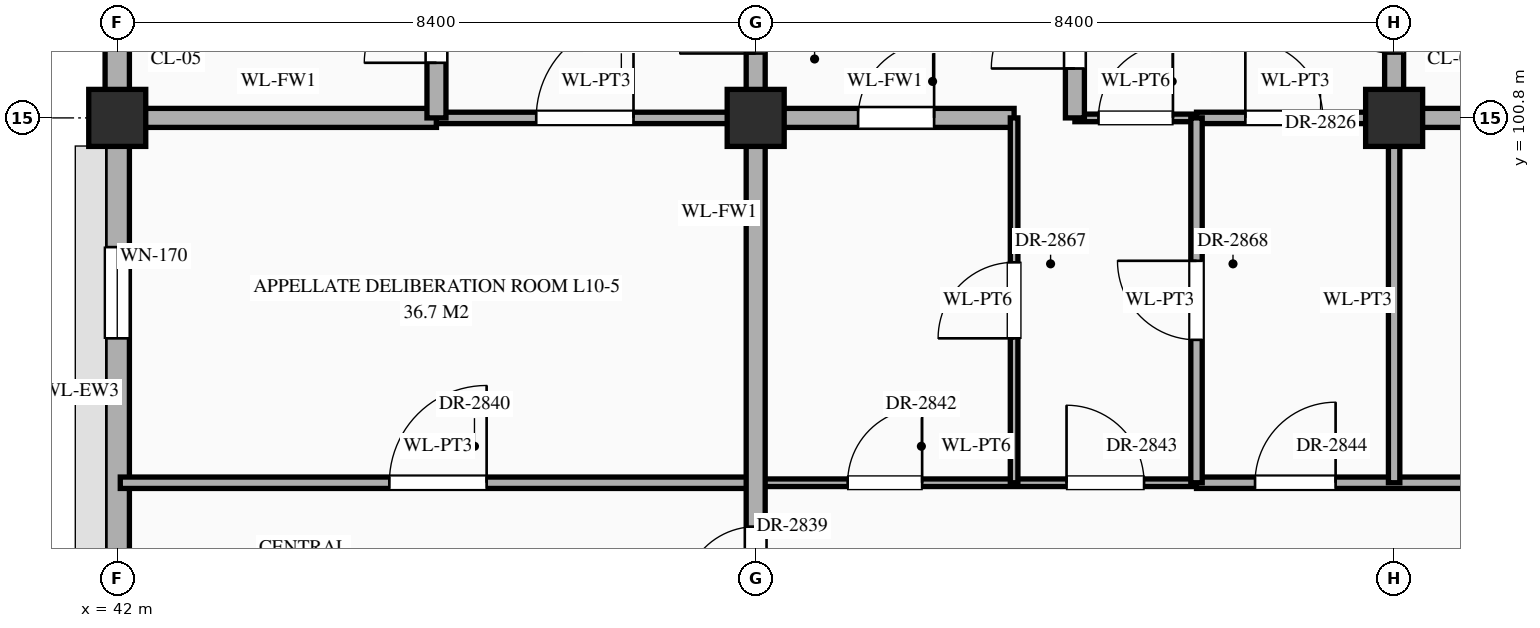
"""IFC4 building model, lengths in metres.
Left out: names, types, materials, properties, quantities, classifications, styles, units other than length and angle.
Written with IfcOpenShell. Run it as: python <this file> out.ifc"""

import sys

from ifc_helpers import new_model, si_unit, direction, frame, frame_2d, origin, origin_2d, place, context, subcontext, project, spatial, rectangle, extrude, element, fill, save


model = new_model("IFC4")
c1 = context("Model", 3, precision=1e-05, world=origin(), true_north=direction((0.0, 1.0)))
c2 = subcontext(c1, "Body", "Model", "MODEL_VIEW")
j1 = project(units=[si_unit("LENGTHUNIT", "METRE"), si_unit("PLANEANGLEUNIT", "RADIAN")], contexts=[c1])
p1 = place(None, origin())
s1 = spatial("IfcSite", under=j1, at=p1, CompositionType="ELEMENT")
p2 = place(p1, origin())
s2 = spatial("IfcBuilding", under=s1, at=p2, CompositionType="ELEMENT")
p3 = place(p2, frame((0.0, 0.0, 43.5)))
s3 = spatial("IfcBuildingStorey", under=s2, at=p3, CompositionType="ELEMENT", Elevation=43.5)
for number, where, z_axis, x_axis in (
    (1, (42.0, 100.8, 0.0), (0.0, 0.0, 1.0), (1.0, 0.0, 0.0)),
    (2, (50.4, 100.8, 0.0), (0.0, 0.0, 1.0), (1.0, 0.0, 0.0)),
    (3, (58.8, 100.8, 0.0), (0.0, 0.0, 1.0), (1.0, 0.0, 0.0)),
):
    element("IfcColumn", number, at=place(p3, frame(where, z_axis=z_axis, x_axis=x_axis)), inside=s3, PredefinedType="COLUMN", context=c2, shape_type="SweptSolid", body=[
        extrude(rectangle(XDim=0.75, YDim=0.75, at=origin_2d()), origin(), (0.0, 0.0, 1.0), 4.2),
    ])
p4 = place(p3, frame((42.0, 93.97, 0.0), z_axis=(0.0, 0.0, 1.0), x_axis=(0.0, 1.0, 0.0)))
e4 = element("IfcWall", 4, at=p4, inside=s3, PredefinedType="STANDARD", context=c2, shape_type="SweptSolid", body=[
    extrude(rectangle(XDim=6.46, YDim=0.32, at=frame_2d((3.23, 0.0))), origin(), (0.0, 0.0, 1.0), 3.35),
])
p5 = place(p4, frame((3.93, 0.0, 0.85)))
e5 = element("IfcOpeningElement", 5, at=p5, cuts=e4, PredefinedType="OPENING", context=c2, shape_type="SweptSolid", body=[
    extrude(rectangle(XDim=1.2, YDim=1.2, at=frame_2d((0.6, 0.6))), frame((0.0, 0.172, 0.0), z_axis=(0.0, -1.0, 0.0), x_axis=(1.0, 0.0, 0.0)), (0.0, 0.0, 1.0), 0.344),
])
p6 = place(p3, frame((42.0, 101.17, 0.0), z_axis=(0.0, 0.0, 1.0), x_axis=(0.0, 1.0, 0.0)))
e6 = element("IfcWall", 6, at=p6, inside=s3, PredefinedType="STANDARD", context=c2, shape_type="SweptSolid", body=[
    extrude(rectangle(XDim=6.46, YDim=0.32, at=frame_2d((3.23, 0.0))), origin(), (0.0, 0.0, 1.0), 3.35),
])
p7 = place(p3, frame((42.04, 96.0, 0.0), z_axis=(0.0, 0.0, 1.0), x_axis=(1.0, 0.0, 0.0)))
e7 = element("IfcWall", 7, at=p7, inside=s3, PredefinedType="STANDARD", context=c2, shape_type="SweptSolid", body=[
    extrude(rectangle(XDim=8.36, YDim=0.15, at=frame_2d((4.18, 0.0))), origin(), (0.0, 0.0, 1.0), 4.0),
])
p8 = place(p7, frame((3.54, 0.0, 0.0)))
e8 = element("IfcOpeningElement", 8, at=p8, cuts=e7, PredefinedType="OPENING", context=c2, shape_type="SweptSolid", body=[
    extrude(rectangle(XDim=1.28, YDim=2.35, at=frame_2d((0.64, 1.175))), frame((0.0, 0.087, 0.0), z_axis=(0.0, -1.0, 0.0), x_axis=(1.0, 0.0, 0.0)), (0.0, 0.0, 1.0), 0.174),
])
p9 = place(p3, frame((50.4, 96.0, 0.0), z_axis=(0.0, 0.0, 1.0), x_axis=(1.0, 0.0, 0.0)))
e9 = element("IfcWall", 9, at=p9, inside=s3, PredefinedType="STANDARD", context=c2, shape_type="SweptSolid", body=[
    extrude(rectangle(XDim=5.8, YDim=0.1, at=frame_2d((2.9, 0.0))), origin(), (0.0, 0.0, 1.0), 3.95),
])
p10 = place(p9, frame((1.21, 0.0, 0.0)))
e10 = element("IfcOpeningElement", 10, at=p10, cuts=e9, PredefinedType="OPENING", context=c2, shape_type="SweptSolid", body=[
    extrude(rectangle(XDim=0.98, YDim=2.35, at=frame_2d((0.49, 1.175))), frame((0.0, 0.062, 0.0), z_axis=(0.0, -1.0, 0.0), x_axis=(1.0, 0.0, 0.0)), (0.0, 0.0, 1.0), 0.124),
])
p11 = place(p9, frame((4.09, 0.0, 0.0)))
e11 = element("IfcOpeningElement", 11, at=p11, cuts=e9, PredefinedType="OPENING", context=c2, shape_type="SweptSolid", body=[
    extrude(rectangle(XDim=1.02, YDim=2.4, at=frame_2d((0.51, 1.2))), frame((0.0, 0.062, 0.0), z_axis=(0.0, -1.0, 0.0), x_axis=(1.0, 0.0, 0.0)), (0.0, 0.0, 1.0), 0.124),
])
p12 = place(p3, frame((56.2, 96.0, 0.0), z_axis=(0.0, 0.0, 1.0), x_axis=(1.0, 0.0, 0.0)))
e12 = element("IfcWall", 12, at=p12, inside=s3, PredefinedType="STANDARD", context=c2, shape_type="SweptSolid", body=[
    extrude(rectangle(XDim=27.8, YDim=0.15, at=frame_2d((13.9, 0.0))), origin(), (0.0, 0.0, 1.0), 3.95),
])
p13 = place(p12, frame((0.77, 0.0, 0.0)))
e13 = element("IfcOpeningElement", 13, at=p13, cuts=e12, PredefinedType="OPENING", context=c2, shape_type="SweptSolid", body=[
    extrude(rectangle(XDim=1.06, YDim=2.4, at=frame_2d((0.53, 1.2))), frame((0.0, 0.087, 0.0), z_axis=(0.0, -1.0, 0.0), x_axis=(1.0, 0.0, 0.0)), (0.0, 0.0, 1.0), 0.174),
])
p14 = place(p12, frame((6.23, 0.0, 0.0)))
e14 = element("IfcOpeningElement", 14, at=p14, cuts=e12, PredefinedType="OPENING", context=c2, shape_type="SweptSolid", body=[
    extrude(rectangle(XDim=1.14, YDim=2.4, at=frame_2d((0.57, 1.2))), frame((0.0, 0.087, 0.0), z_axis=(0.0, -1.0, 0.0), x_axis=(1.0, 0.0, 0.0)), (0.0, 0.0, 1.0), 0.174),
])
p15 = place(p12, frame((14.75, 0.0, 0.0)))
e15 = element("IfcOpeningElement", 15, at=p15, cuts=e12, PredefinedType="OPENING", context=c2, shape_type="SweptSolid", body=[
    extrude(rectangle(XDim=0.9, YDim=2.15, at=frame_2d((0.45, 1.075))), frame((0.0, 0.087, 0.0), z_axis=(0.0, -1.0, 0.0), x_axis=(1.0, 0.0, 0.0)), (0.0, 0.0, 1.0), 0.174),
])
p16 = place(p12, frame((23.17, 0.0, 0.0)))
e16 = element("IfcOpeningElement", 16, at=p16, cuts=e12, PredefinedType="OPENING", context=c2, shape_type="SweptSolid", body=[
    extrude(rectangle(XDim=0.86, YDim=2.1, at=frame_2d((0.43, 1.05))), frame((0.0, 0.087, 0.0), z_axis=(0.0, -1.0, 0.0), x_axis=(1.0, 0.0, 0.0)), (0.0, 0.0, 1.0), 0.174),
])
p17 = place(p3, frame((42.04, 100.8, 0.0), z_axis=(0.0, 0.0, 1.0), x_axis=(1.0, 0.0, 0.0)))
e17 = element("IfcWall", 17, at=p17, inside=s3, PredefinedType="STANDARD", context=c2, shape_type="SweptSolid", body=[
    extrude(rectangle(XDim=4.16, YDim=0.25, at=frame_2d((2.08, 0.0))), origin(), (0.0, 0.0, 1.0), 3.15),
])
p18 = place(p3, frame((46.2, 100.8, 0.0), z_axis=(0.0, 0.0, 1.0), x_axis=(1.0, 0.0, 0.0)))
e18 = element("IfcWall", 18, at=p18, inside=s3, PredefinedType="STANDARD", context=c2, shape_type="SweptSolid", body=[
    extrude(rectangle(XDim=4.2, YDim=0.15, at=frame_2d((2.1, 0.0))), origin(), (0.0, 0.0, 1.0), 3.15),
])
p19 = place(p18, frame((1.312, 0.0, 0.0)))
e19 = element("IfcOpeningElement", 19, at=p19, cuts=e18, PredefinedType="OPENING", context=c2, shape_type="SweptSolid", body=[
    extrude(rectangle(XDim=1.28, YDim=2.35, at=frame_2d((0.64, 1.175))), frame((0.0, 0.087, 0.0), z_axis=(0.0, -1.0, 0.0), x_axis=(1.0, 0.0, 0.0)), (0.0, 0.0, 1.0), 0.174),
])
p20 = place(p3, frame((50.4, 100.8, 0.0), z_axis=(0.0, 0.0, 1.0), x_axis=(1.0, 0.0, 0.0)))
e20 = element("IfcWall", 20, at=p20, inside=s3, PredefinedType="STANDARD", context=c2, shape_type="SweptSolid", body=[
    extrude(rectangle(XDim=3.4, YDim=0.25, at=frame_2d((1.7, 0.0))), origin(), (0.0, 0.0, 1.0), 3.1),
])
p21 = place(p20, frame((1.347, 0.0, 0.0)))
e21 = element("IfcOpeningElement", 21, at=p21, cuts=e20, PredefinedType="OPENING", context=c2, shape_type="SweptSolid", body=[
    extrude(rectangle(XDim=1.0, YDim=2.2, at=frame_2d((0.5, 1.1))), frame((0.0, 0.137, 0.0), z_axis=(0.0, -1.0, 0.0), x_axis=(1.0, 0.0, 0.0)), (0.0, 0.0, 1.0), 0.274),
])
p22 = place(p3, frame((54.6, 100.8, 0.0), z_axis=(0.0, 0.0, 1.0), x_axis=(1.0, 0.0, 0.0)))
e22 = element("IfcWall", 22, at=p22, inside=s3, PredefinedType="STANDARD", context=c2, shape_type="SweptSolid", body=[
    extrude(rectangle(XDim=1.6, YDim=0.1, at=frame_2d((0.8, 0.0))), origin(), (0.0, 0.0, 1.0), 3.1),
])
p23 = place(p22, frame((0.31, 0.0, 0.0)))
e23 = element("IfcOpeningElement", 23, at=p23, cuts=e22, PredefinedType="OPENING", context=c2, shape_type="SweptSolid", body=[
    extrude(rectangle(XDim=0.98, YDim=2.35, at=frame_2d((0.49, 1.175))), frame((0.0, 0.062, 0.0), z_axis=(0.0, -1.0, 0.0), x_axis=(1.0, 0.0, 0.0)), (0.0, 0.0, 1.0), 0.124),
])
p24 = place(p3, frame((56.2, 100.8, 0.0), z_axis=(0.0, 0.0, 1.0), x_axis=(1.0, 0.0, 0.0)))
e24 = element("IfcWall", 24, at=p24, inside=s3, PredefinedType="STANDARD", context=c2, shape_type="SweptSolid", body=[
    extrude(rectangle(XDim=2.6, YDim=0.15, at=frame_2d((1.3, 0.0))), origin(), (0.0, 0.0, 1.0), 3.1),
])
p25 = place(p24, frame((0.643, 0.0, 0.0)))
e25 = element("IfcOpeningElement", 25, at=p25, cuts=e24, PredefinedType="OPENING", context=c2, shape_type="SweptSolid", body=[
    extrude(rectangle(XDim=1.02, YDim=2.4, at=frame_2d((0.51, 1.2))), frame((0.0, 0.087, 0.0), z_axis=(0.0, -1.0, 0.0), x_axis=(1.0, 0.0, 0.0)), (0.0, 0.0, 1.0), 0.174),
])
p26 = place(p3, frame((58.8, 100.8, 0.0), z_axis=(0.0, 0.0, 1.0), x_axis=(1.0, 0.0, 0.0)))
e26 = element("IfcWall", 26, at=p26, inside=s3, PredefinedType="STANDARD", context=c2, shape_type="SweptSolid", body=[
    extrude(rectangle(XDim=12.6, YDim=0.25, at=frame_2d((6.3, 0.0))), origin(), (0.0, 0.0, 1.0), 3.1),
])
p27 = place(p26, frame((3.725, 0.0, 0.0)))
e27 = element("IfcOpeningElement", 27, at=p27, cuts=e26, PredefinedType="OPENING", context=c2, shape_type="SweptSolid", body=[
    extrude(rectangle(XDim=0.95, YDim=2.15, at=frame_2d((0.475, 1.075))), frame((0.0, 0.137, 0.0), z_axis=(0.0, -1.0, 0.0), x_axis=(1.0, 0.0, 0.0)), (0.0, 0.0, 1.0), 0.274),
])
p28 = place(p3, frame((46.2, 100.8, 0.0), z_axis=(0.0, 0.0, 1.0), x_axis=(0.0, 1.0, 0.0)))
e28 = element("IfcWall", 28, at=p28, inside=s3, PredefinedType="STANDARD", context=c2, shape_type="SweptSolid", body=[
    extrude(rectangle(XDim=3.6, YDim=0.25, at=frame_2d((1.8, 0.0))), origin(), (0.0, 0.0, 1.0), 4.0),
])
p29 = place(p28, frame((0.725, 0.0, 0.0)))
e29 = element("IfcOpeningElement", 29, at=p29, cuts=e28, PredefinedType="OPENING", context=c2, shape_type="SweptSolid", body=[
    extrude(rectangle(XDim=0.95, YDim=2.15, at=frame_2d((0.475, 1.075))), frame((0.0, 0.137, 0.0), z_axis=(0.0, -1.0, 0.0), x_axis=(1.0, 0.0, 0.0)), (0.0, 0.0, 1.0), 0.274),
])
p30 = place(p3, frame((50.4, 91.2, 0.0), z_axis=(0.0, 0.0, 1.0), x_axis=(0.0, 1.0, 0.0)))
e30 = element("IfcWall", 30, at=p30, inside=s3, PredefinedType="STANDARD", context=c2, shape_type="SweptSolid", body=[
    extrude(rectangle(XDim=13.2, YDim=0.25, at=frame_2d((6.6, 0.0))), origin(), (0.0, 0.0, 1.0), 3.2),
])
p31 = place(p30, frame((0.552, 0.0, 0.0)))
e31 = element("IfcOpeningElement", 31, at=p31, cuts=e30, PredefinedType="OPENING", context=c2, shape_type="SweptSolid", body=[
    extrude(rectangle(XDim=1.0, YDim=2.2, at=frame_2d((0.5, 1.1))), frame((0.0, 0.137, 0.0), z_axis=(0.0, -1.0, 0.0), x_axis=(1.0, 0.0, 0.0)), (0.0, 0.0, 1.0), 0.274),
])
p32 = place(p30, frame((10.448, 0.0, 0.0)))
e32 = element("IfcOpeningElement", 32, at=p32, cuts=e30, PredefinedType="OPENING", context=c2, shape_type="SweptSolid", body=[
    extrude(rectangle(XDim=1.0, YDim=2.2, at=frame_2d((0.5, 1.1))), frame((0.0, 0.137, 0.0), z_axis=(0.0, -1.0, 0.0), x_axis=(1.0, 0.0, 0.0)), (0.0, 0.0, 1.0), 0.274),
])
p33 = place(p30, frame((3.272, 0.0, 0.0)))
e33 = element("IfcOpeningElement", 33, at=p33, cuts=e30, PredefinedType="OPENING", context=c2, shape_type="SweptSolid", body=[
    extrude(rectangle(XDim=0.95, YDim=2.15, at=frame_2d((0.475, 1.075))), frame((0.0, 0.137, 0.0), z_axis=(0.0, -1.0, 0.0), x_axis=(1.0, 0.0, 0.0)), (0.0, 0.0, 1.0), 0.274),
])
p34 = place(p3, frame((53.8, 96.0, 0.0), z_axis=(0.0, 0.0, 1.0), x_axis=(0.0, 1.0, 0.0)))
e34 = element("IfcWall", 34, at=p34, inside=s3, PredefinedType="STANDARD", context=c2, shape_type="SweptSolid", body=[
    extrude(rectangle(XDim=4.8, YDim=0.1, at=frame_2d((2.4, 0.0))), origin(), (0.0, 0.0, 1.0), 3.95),
])
p35 = place(p34, frame((1.9, 0.0, 0.0)))
e35 = element("IfcOpeningElement", 35, at=p35, cuts=e34, PredefinedType="OPENING", context=c2, shape_type="SweptSolid", body=[
    extrude(rectangle(XDim=1.0, YDim=2.25, at=frame_2d((0.5, 1.125))), frame((0.0, 0.062, 0.0), z_axis=(0.0, -1.0, 0.0), x_axis=(1.0, 0.0, 0.0)), (0.0, 0.0, 1.0), 0.124),
])
p36 = place(p3, frame((54.6, 100.8, 0.0), z_axis=(0.0, 0.0, 1.0), x_axis=(0.0, 1.0, 0.0)))
e36 = element("IfcWall", 36, at=p36, inside=s3, PredefinedType="STANDARD", context=c2, shape_type="SweptSolid", body=[
    extrude(rectangle(XDim=3.6, YDim=0.25, at=frame_2d((1.8, 0.0))), origin(), (0.0, 0.0, 1.0), 3.65),
])
p37 = place(p36, frame((0.65, 0.0, 0.0)))
e37 = element("IfcOpeningElement", 37, at=p37, cuts=e36, PredefinedType="OPENING", context=c2, shape_type="SweptSolid", body=[
    extrude(rectangle(XDim=1.1, YDim=2.2, at=frame_2d((0.55, 1.1))), frame((0.0, 0.137, 0.0), z_axis=(0.0, -1.0, 0.0), x_axis=(1.0, 0.0, 0.0)), (0.0, 0.0, 1.0), 0.274),
])
p38 = place(p3, frame((56.2, 96.0, 0.0), z_axis=(0.0, 0.0, 1.0), x_axis=(0.0, 1.0, 0.0)))
e38 = element("IfcWall", 38, at=p38, inside=s3, PredefinedType="STANDARD", context=c2, shape_type="SweptSolid", body=[
    extrude(rectangle(XDim=4.8, YDim=0.15, at=frame_2d((2.4, 0.0))), origin(), (0.0, 0.0, 1.0), 3.95),
])
p39 = place(p38, frame((1.88, 0.0, 0.0)))
e39 = element("IfcOpeningElement", 39, at=p39, cuts=e38, PredefinedType="OPENING", context=c2, shape_type="SweptSolid", body=[
    extrude(rectangle(XDim=1.04, YDim=2.2, at=frame_2d((0.52, 1.1))), frame((0.0, 0.087, 0.0), z_axis=(0.0, -1.0, 0.0), x_axis=(1.0, 0.0, 0.0)), (0.0, 0.0, 1.0), 0.174),
])
p40 = place(p3, frame((58.8, 96.0, 0.0), z_axis=(0.0, 0.0, 1.0), x_axis=(0.0, 1.0, 0.0)))
e40 = element("IfcWall", 40, at=p40, inside=s3, PredefinedType="STANDARD", context=c2, shape_type="SweptSolid", body=[
    extrude(rectangle(XDim=4.8, YDim=0.15, at=frame_2d((2.4, 0.0))), origin(), (0.0, 0.0, 1.0), 3.2),
])
p41 = place(p3, frame((58.8, 100.8, 0.0), z_axis=(0.0, 0.0, 1.0), x_axis=(0.0, 1.0, 0.0)))
e41 = element("IfcWall", 41, at=p41, inside=s3, PredefinedType="STANDARD", context=c2, shape_type="SweptSolid", body=[
    extrude(rectangle(XDim=2.4, YDim=0.25, at=frame_2d((1.2, 0.0))), origin(), (0.0, 0.0, 1.0), 3.2),
])
p42 = place(p41, frame((0.847, 0.0, 0.0)))
e42 = element("IfcOpeningElement", 42, at=p42, cuts=e41, PredefinedType="OPENING", context=c2, shape_type="SweptSolid", body=[
    extrude(rectangle(XDim=1.0, YDim=2.2, at=frame_2d((0.5, 1.1))), frame((0.0, 0.137, 0.0), z_axis=(0.0, -1.0, 0.0), x_axis=(1.0, 0.0, 0.0)), (0.0, 0.0, 1.0), 0.274),
])
p43 = place(p5, origin())
e43 = element("IfcWindow", 43, at=p43, inside=s3, PartitioningType="SINGLE_PANEL", PredefinedType="WINDOW", context=c2, shape_type="SweptSolid", body=[
    extrude(rectangle(XDim=1.2, YDim=1.2, at=frame_2d((0.6, 0.6))), frame((0.0, 0.03, 0.0), z_axis=(0.0, -1.0, 0.0), x_axis=(1.0, 0.0, 0.0)), (0.0, 0.0, 1.0), 0.06),
])
fill(e5, e43)
p44 = place(p42, origin())
e44 = element("IfcDoor", 44, at=p44, inside=s3, OperationType="SINGLE_SWING_RIGHT", PredefinedType="DOOR", context=c2, shape_type="SweptSolid", body=[
    extrude(rectangle(XDim=1.0, YDim=2.2, at=frame_2d((0.5, 1.1))), frame((0.0, 0.025, 0.0), z_axis=(0.0, -1.0, 0.0), x_axis=(1.0, 0.0, 0.0)), (0.0, 0.0, 1.0), 0.05),
])
fill(e42, e44)
p45 = place(p29, origin())
e45 = element("IfcDoor", 45, at=p45, inside=s3, OperationType="SINGLE_SWING_LEFT", PredefinedType="DOOR", context=c2, shape_type="SweptSolid", body=[
    extrude(rectangle(XDim=0.95, YDim=2.15, at=frame_2d((0.475, 1.075))), frame((0.0, 0.025, 0.0), z_axis=(0.0, -1.0, 0.0), x_axis=(1.0, 0.0, 0.0)), (0.0, 0.0, 1.0), 0.05),
])
fill(e29, e45)
p46 = place(p32, origin())
e46 = element("IfcDoor", 46, at=p46, inside=s3, OperationType="SINGLE_SWING_LEFT", PredefinedType="DOOR", context=c2, shape_type="SweptSolid", body=[
    extrude(rectangle(XDim=1.0, YDim=2.2, at=frame_2d((0.5, 1.1))), frame((0.0, 0.025, 0.0), z_axis=(0.0, -1.0, 0.0), x_axis=(1.0, 0.0, 0.0)), (0.0, 0.0, 1.0), 0.05),
])
fill(e32, e46)
p47 = place(p19, origin())
e47 = element("IfcDoor", 47, at=p47, inside=s3, OperationType="SINGLE_SWING_RIGHT", PredefinedType="DOOR", context=c2, shape_type="SweptSolid", body=[
    extrude(rectangle(XDim=1.28, YDim=2.35, at=frame_2d((0.64, 1.175))), frame((0.0, 0.025, 0.0), z_axis=(0.0, -1.0, 0.0), x_axis=(1.0, 0.0, 0.0)), (0.0, 0.0, 1.0), 0.05),
])
fill(e19, e47)
p48 = place(p37, origin())
e48 = element("IfcDoor", 48, at=p48, inside=s3, OperationType="SINGLE_SWING_LEFT", PredefinedType="DOOR", context=c2, shape_type="SweptSolid", body=[
    extrude(rectangle(XDim=1.1, YDim=2.2, at=frame_2d((0.55, 1.1))), frame((0.0, 0.025, 0.0), z_axis=(0.0, -1.0, 0.0), x_axis=(1.0, 0.0, 0.0)), (0.0, 0.0, 1.0), 0.05),
])
fill(e37, e48)
p49 = place(p21, origin())
e49 = element("IfcDoor", 49, at=p49, inside=s3, OperationType="SINGLE_SWING_RIGHT", PredefinedType="DOOR", context=c2, shape_type="SweptSolid", body=[
    extrude(rectangle(XDim=1.0, YDim=2.2, at=frame_2d((0.5, 1.1))), frame((0.0, 0.025, 0.0), z_axis=(0.0, -1.0, 0.0), x_axis=(1.0, 0.0, 0.0)), (0.0, 0.0, 1.0), 0.05),
])
fill(e21, e49)
p50 = place(p23, origin())
e50 = element("IfcDoor", 50, at=p50, inside=s3, OperationType="SINGLE_SWING_RIGHT", PredefinedType="DOOR", context=c2, shape_type="SweptSolid", body=[
    extrude(rectangle(XDim=0.98, YDim=2.35, at=frame_2d((0.49, 1.175))), frame((0.0, 0.025, 0.0), z_axis=(0.0, -1.0, 0.0), x_axis=(1.0, 0.0, 0.0)), (0.0, 0.0, 1.0), 0.05),
])
fill(e23, e50)
p51 = place(p25, origin())
e51 = element("IfcDoor", 51, at=p51, inside=s3, OperationType="SINGLE_SWING_LEFT", PredefinedType="DOOR", context=c2, shape_type="SweptSolid", body=[
    extrude(rectangle(XDim=1.02, YDim=2.4, at=frame_2d((0.51, 1.2))), frame((0.0, 0.025, 0.0), z_axis=(0.0, -1.0, 0.0), x_axis=(1.0, 0.0, 0.0)), (0.0, 0.0, 1.0), 0.05),
])
fill(e25, e51)
p52 = place(p33, origin())
e52 = element("IfcDoor", 52, at=p52, inside=s3, OperationType="SINGLE_SWING_LEFT", PredefinedType="DOOR", context=c2, shape_type="SweptSolid", body=[
    extrude(rectangle(XDim=0.95, YDim=2.15, at=frame_2d((0.475, 1.075))), frame((0.0, 0.025, 0.0), z_axis=(0.0, -1.0, 0.0), x_axis=(1.0, 0.0, 0.0)), (0.0, 0.0, 1.0), 0.05),
])
fill(e33, e52)
p53 = place(p8, origin())
e53 = element("IfcDoor", 53, at=p53, inside=s3, OperationType="SINGLE_SWING_RIGHT", PredefinedType="DOOR", context=c2, shape_type="SweptSolid", body=[
    extrude(rectangle(XDim=1.28, YDim=2.35, at=frame_2d((0.64, 1.175))), frame((0.0, 0.025, 0.0), z_axis=(0.0, -1.0, 0.0), x_axis=(1.0, 0.0, 0.0)), (0.0, 0.0, 1.0), 0.05),
])
fill(e8, e53)
p54 = place(p10, origin())
e54 = element("IfcDoor", 54, at=p54, inside=s3, OperationType="SINGLE_SWING_RIGHT", PredefinedType="DOOR", context=c2, shape_type="SweptSolid", body=[
    extrude(rectangle(XDim=0.98, YDim=2.35, at=frame_2d((0.49, 1.175))), frame((0.0, 0.025, 0.0), z_axis=(0.0, -1.0, 0.0), x_axis=(1.0, 0.0, 0.0)), (0.0, 0.0, 1.0), 0.05),
])
fill(e10, e54)
p55 = place(p11, origin())
e55 = element("IfcDoor", 55, at=p55, inside=s3, OperationType="SINGLE_SWING_LEFT", PredefinedType="DOOR", context=c2, shape_type="SweptSolid", body=[
    extrude(rectangle(XDim=1.02, YDim=2.4, at=frame_2d((0.51, 1.2))), frame((0.0, 0.025, 0.0), z_axis=(0.0, -1.0, 0.0), x_axis=(1.0, 0.0, 0.0)), (0.0, 0.0, 1.0), 0.05),
])
fill(e11, e55)
p56 = place(p13, origin())
e56 = element("IfcDoor", 56, at=p56, inside=s3, OperationType="SINGLE_SWING_RIGHT", PredefinedType="DOOR", context=c2, shape_type="SweptSolid", body=[
    extrude(rectangle(XDim=1.06, YDim=2.4, at=frame_2d((0.53, 1.2))), frame((0.0, 0.025, 0.0), z_axis=(0.0, -1.0, 0.0), x_axis=(1.0, 0.0, 0.0)), (0.0, 0.0, 1.0), 0.05),
])
fill(e13, e56)
p57 = place(p35, origin())
e57 = element("IfcDoor", 57, at=p57, inside=s3, OperationType="SINGLE_SWING_LEFT", PredefinedType="DOOR", context=c2, shape_type="SweptSolid", body=[
    extrude(rectangle(XDim=1.0, YDim=2.25, at=frame_2d((0.5, 1.125))), frame((0.0, 0.025, 0.0), z_axis=(0.0, -1.0, 0.0), x_axis=(1.0, 0.0, 0.0)), (0.0, 0.0, 1.0), 0.05),
])
fill(e35, e57)
p58 = place(p39, origin())
e58 = element("IfcDoor", 58, at=p58, inside=s3, OperationType="SINGLE_SWING_RIGHT", PredefinedType="DOOR", context=c2, shape_type="SweptSolid", body=[
    extrude(rectangle(XDim=1.04, YDim=2.2, at=frame_2d((0.52, 1.1))), frame((0.0, 0.025, 0.0), z_axis=(0.0, -1.0, 0.0), x_axis=(1.0, 0.0, 0.0)), (0.0, 0.0, 1.0), 0.05),
])
fill(e39, e58)
save(model, sys.argv[1])
